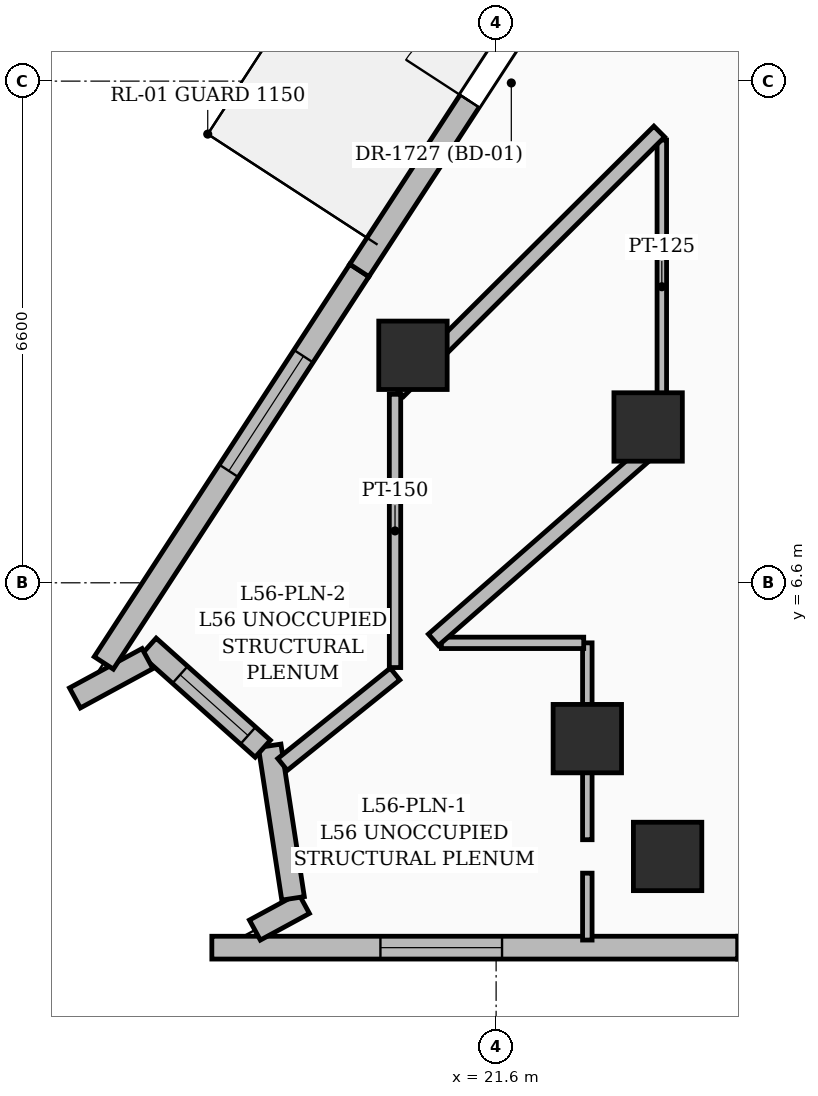
"""IFC4 building model, lengths in metres.
Left out: names, types, materials, properties, quantities, classifications, styles, units other than length and angle.
Written with IfcOpenShell. Run it as: python <this file> out.ifc"""

import sys

from ifc_helpers import new_model, si_unit, direction, frame, frame_2d, origin, origin_2d, place, context, subcontext, project, spatial, rectangle, extrude, element, fill, save


model = new_model("IFC4")
c1 = context("Model", 3, precision=1e-05, world=origin(), true_north=direction((0.0, 1.0)))
c2 = subcontext(c1, "Body", "Model", "MODEL_VIEW")
j1 = project(units=[si_unit("LENGTHUNIT", "METRE"), si_unit("PLANEANGLEUNIT", "RADIAN")], contexts=[c1])
p1 = place(None, origin())
s1 = spatial("IfcSite", under=j1, at=p1, CompositionType="ELEMENT")
p2 = place(p1, origin())
s2 = spatial("IfcBuilding", under=s1, at=p2, CompositionType="ELEMENT")
p3 = place(p2, frame((0.0, 0.0, 218.25)))
s3 = spatial("IfcBuildingStorey", under=s2, at=p3, CompositionType="ELEMENT", Elevation=218.25)
for number, where, z_axis, x_axis in (
    (1, (22.8, 4.55, 0.0), (0.0, 0.0, 1.0), (1.0, 0.0, 0.0)),
    (2, (23.6, 8.65, 0.0), (0.0, 0.0, 1.0), (1.0, 0.0, 0.0)),
    (3, (23.856, 3.0, 0.0), (0.0, 0.0, 1.0), (1.0, 0.0, 0.0)),
    (4, (20.506, 9.593, 0.0), (0.0, 0.0, 1.0), (1.0, 0.0, 0.0)),
):
    element("IfcColumn", number, at=place(p3, frame(where, z_axis=z_axis, x_axis=x_axis)), inside=s3, PredefinedType="COLUMN", context=c2, shape_type="SweptSolid", body=[
        extrude(rectangle(XDim=0.9, YDim=0.9, at=origin_2d()), origin(), (0.0, 0.0, 1.0), 3.75),
    ])
p4 = place(p3, frame((31.421, 1.8, 0.0), z_axis=(0.0, 0.0, 1.0), x_axis=(-1.0, 0.0, 0.0)))
e5 = element("IfcWall", 5, at=p4, inside=s3, PredefinedType="SOLIDWALL", context=c2, shape_type="SweptSolid", body=[
    extrude(rectangle(XDim=6.643, YDim=0.3, at=frame_2d((3.321, 0.0))), origin(), (0.0, 0.0, 1.0), 3.5),
])
p5 = place(p4, frame((4.775, 0.0, 0.8)))
e6 = element("IfcOpeningElement", 6, at=p5, cuts=e5, PredefinedType="OPENING", context=c2, shape_type="SweptSolid", body=[
    extrude(rectangle(XDim=1.2, YDim=1.8, at=frame_2d((0.6, 0.9))), frame((0.0, 0.16, 0.0), z_axis=(0.0, -1.0, 0.0), x_axis=(1.0, 0.0, 0.0)), (0.0, 0.0, 1.0), 0.32),
])
p6 = place(p3, frame((24.778, 1.8, 0.0), z_axis=(0.0, 0.0, 1.0), x_axis=(-1.0, 0.0, 0.0)))
e7 = element("IfcWall", 7, at=p6, inside=s3, PredefinedType="SOLIDWALL", context=c2, shape_type="SweptSolid", body=[
    extrude(rectangle(XDim=6.918, YDim=0.3, at=frame_2d((3.459, 0.0))), origin(), (0.0, 0.0, 1.0), 3.5),
])
p7 = place(p6, frame((3.1, 0.0, 0.55)))
e8 = element("IfcOpeningElement", 8, at=p7, cuts=e7, PredefinedType="OPENING", context=c2, shape_type="SweptSolid", body=[
    extrude(rectangle(XDim=1.6, YDim=2.2, at=frame_2d((0.8, 1.1))), frame((0.0, 0.16, 0.0), z_axis=(0.0, -1.0, 0.0), x_axis=(1.0, 0.0, 0.0)), (0.0, 0.0, 1.0), 0.32),
])
p8 = place(p3, frame((18.426, 2.031, 0.0), z_axis=(0.0, 0.0, 1.0), x_axis=(0.878833528688, 0.47712852446, 0.0)))
e9 = element("IfcWall", 9, at=p8, inside=s3, PredefinedType="SOLIDWALL", context=c2, shape_type="SweptSolid", body=[
    extrude(rectangle(XDim=0.735, YDim=0.3, at=frame_2d((0.367, 0.0))), origin(), (0.0, 0.0, 1.0), 3.5),
])
p9 = place(p3, frame((18.928, 2.448, 0.0), z_axis=(0.0, 0.0, 1.0), x_axis=(-0.151514993769, 0.98845495935, 0.0)))
e10 = element("IfcWall", 10, at=p9, inside=s3, PredefinedType="SOLIDWALL", context=c2, shape_type="SweptSolid", body=[
    extrude(rectangle(XDim=2.03, YDim=0.3, at=frame_2d((1.015, 0.0))), origin(), (0.0, 0.0, 1.0), 3.5),
])
p10 = place(p3, frame((18.53, 4.417, 0.0), z_axis=(0.0, 0.0, 1.0), x_axis=(-0.745548529149, 0.666451341572, 0.0)))
e11 = element("IfcWall", 11, at=p10, inside=s3, PredefinedType="SOLIDWALL", context=c2, shape_type="SweptSolid", body=[
    extrude(rectangle(XDim=2.016, YDim=0.3, at=frame_2d((1.008, 0.0))), origin(), (0.0, 0.0, 1.0), 3.5),
])
p11 = place(p10, frame((0.26, 0.0, 0.8)))
e12 = element("IfcOpeningElement", 12, at=p11, cuts=e11, PredefinedType="OPENING", context=c2, shape_type="SweptSolid", body=[
    extrude(rectangle(XDim=1.2, YDim=1.8, at=frame_2d((0.6, 0.9))), frame((0.0, 0.16, 0.0), z_axis=(0.0, -1.0, 0.0), x_axis=(1.0, 0.0, 0.0)), (0.0, 0.0, 1.0), 0.32),
])
p12 = place(p3, frame((17.013, 5.603, 0.0), z_axis=(0.0, 0.0, 1.0), x_axis=(-0.879044634191, -0.476739479275, 0.0)))
e13 = element("IfcWall", 13, at=p12, inside=s3, PredefinedType="SOLIDWALL", context=c2, shape_type="SweptSolid", body=[
    extrude(rectangle(XDim=1.086, YDim=0.3, at=frame_2d((0.543, 0.0))), origin(), (0.0, 0.0, 1.0), 3.5),
])
p13 = place(p3, frame((16.438, 5.546, 0.0), z_axis=(0.0, 0.0, 1.0), x_axis=(0.545606524508, 0.838041478934, 0.0)))
e14 = element("IfcWall", 14, at=p13, inside=s3, PredefinedType="SOLIDWALL", context=c2, shape_type="SweptSolid", body=[
    extrude(rectangle(XDim=6.162, YDim=0.3, at=frame_2d((3.081, 0.0))), origin(), (0.0, 0.0, 1.0), 3.5),
])
p14 = place(p13, frame((3.015, 0.0, 0.6)))
e15 = element("IfcOpeningElement", 15, at=p14, cuts=e14, PredefinedType="OPENING", context=c2, shape_type="SweptSolid", body=[
    extrude(rectangle(XDim=1.8, YDim=2.1, at=frame_2d((0.9, 1.05))), frame((0.0, 0.16, 0.0), z_axis=(0.0, -1.0, 0.0), x_axis=(1.0, 0.0, 0.0)), (0.0, 0.0, 1.0), 0.32),
])
p15 = place(p3, frame((19.801, 10.71, 0.0), z_axis=(0.0, 0.0, 1.0), x_axis=(0.545640788954, 0.838019170085, 0.0)))
e16 = element("IfcWall", 16, at=p15, inside=s3, PredefinedType="SOLIDWALL", context=c2, shape_type="SweptSolid", body=[
    extrude(rectangle(XDim=6.772, YDim=0.3, at=frame_2d((3.386, 0.0))), origin(), (0.0, 0.0, 1.0), 3.5),
])
p16 = place(p15, frame((2.657, 0.0, 0.0)))
e17 = element("IfcOpeningElement", 17, at=p16, cuts=e16, PredefinedType="OPENING", context=c2, shape_type="SweptSolid", body=[
    extrude(rectangle(XDim=1.0, YDim=2.2, at=frame_2d((0.5, 1.1))), frame((0.0, 0.16, 0.0), z_axis=(0.0, -1.0, 0.0), x_axis=(1.0, 0.0, 0.0)), (0.0, 0.0, 1.0), 0.32),
])
p17 = place(p3, frame((22.8, 2.78, 0.0), z_axis=(0.0, 0.0, 1.0), x_axis=(0.0, -1.0, 0.0)))
e18 = element("IfcWall", 18, at=p17, inside=s3, PredefinedType="PARTITIONING", context=c2, shape_type="SweptSolid", body=[
    extrude(rectangle(XDim=0.88, YDim=0.125, at=frame_2d((0.44, 0.0))), origin(), (0.0, 0.0, 1.0), 3.5),
])
p18 = place(p3, frame((22.8, 5.81, 0.0), z_axis=(0.0, 0.0, 1.0), x_axis=(0.0, -1.0, 0.0)))
e19 = element("IfcWall", 19, at=p18, inside=s3, PredefinedType="PARTITIONING", context=c2, shape_type="SweptSolid", body=[
    extrude(rectangle(XDim=2.59, YDim=0.125, at=frame_2d((1.295, 0.0))), origin(), (0.0, 0.0, 1.0), 2.82),
])
p19 = place(p3, frame((22.752, 5.81, 0.0), z_axis=(0.0, 0.0, 1.0), x_axis=(-1.0, 0.0, 0.0)))
e20 = element("IfcWall", 20, at=p19, inside=s3, PredefinedType="PARTITIONING", context=c2, shape_type="SweptSolid", body=[
    extrude(rectangle(XDim=1.873, YDim=0.15, at=frame_2d((0.936, 0.0))), origin(), (0.0, 0.0, 1.0), 2.82),
])
p20 = place(p3, frame((20.27, 5.4, 0.0), z_axis=(0.0, 0.0, 1.0), x_axis=(-0.779336278345, -0.626605909049, 0.0)))
e21 = element("IfcWall", 21, at=p20, inside=s3, PredefinedType="PARTITIONING", context=c2, shape_type="SweptSolid", body=[
    extrude(rectangle(XDim=1.899, YDim=0.2, at=frame_2d((0.949, 0.0))), origin(), (0.0, 0.0, 1.0), 3.5),
])
p21 = place(p3, frame((23.78, 8.48, 0.0), z_axis=(0.0, 0.0, 1.0), x_axis=(-0.752440343791, -0.65866040494, 0.0)))
e22 = element("IfcWall", 22, at=p21, inside=s3, PredefinedType="PARTITIONING", context=c2, shape_type="SweptSolid", body=[
    extrude(rectangle(XDim=3.993, YDim=0.2, at=frame_2d((1.997, 0.0))), origin(), (0.0, 0.0, 1.0), 2.82),
])
p22 = place(p3, frame((23.78, 12.425, 0.0), z_axis=(0.0, 0.0, 1.0), x_axis=(0.0, -1.0, 0.0)))
e23 = element("IfcWall", 23, at=p22, inside=s3, PredefinedType="PARTITIONING", context=c2, shape_type="SweptSolid", body=[
    extrude(rectangle(XDim=3.86, YDim=0.125, at=frame_2d((1.93, 0.0))), origin(), (0.0, 0.0, 1.0), 3.5),
])
p23 = place(p3, frame((20.27, 9.08, 0.0), z_axis=(0.0, 0.0, 1.0), x_axis=(0.0, -1.0, 0.0)))
e24 = element("IfcWall", 24, at=p23, inside=s3, PredefinedType="PARTITIONING", context=c2, shape_type="SweptSolid", body=[
    extrude(rectangle(XDim=3.595, YDim=0.15, at=frame_2d((1.797, 0.0))), origin(), (0.0, 0.0, 1.0), 3.5),
])
p24 = place(p3, frame((23.746, 12.537, 0.0), z_axis=(0.0, 0.0, 1.0), x_axis=(-0.709120600964, -0.705087209704, 0.0)))
e25 = element("IfcWall", 25, at=p24, inside=s3, PredefinedType="PARTITIONING", context=c2, shape_type="SweptSolid", body=[
    extrude(rectangle(XDim=4.842, YDim=0.2, at=frame_2d((2.421, 0.0))), origin(), (0.0, 0.0, 1.0), 2.82),
])
p25 = place(p7, origin())
e26 = element("IfcWindow", 26, at=p25, inside=s3, PartitioningType="SINGLE_PANEL", PredefinedType="WINDOW", context=c2, shape_type="SweptSolid", body=[
    extrude(rectangle(XDim=1.6, YDim=2.2, at=frame_2d((0.8, 1.1))), frame((0.0, 0.03, 0.0), z_axis=(0.0, -1.0, 0.0), x_axis=(1.0, 0.0, 0.0)), (0.0, 0.0, 1.0), 0.06),
])
fill(e8, e26)
p26 = place(p11, origin())
e27 = element("IfcWindow", 27, at=p26, inside=s3, PartitioningType="SINGLE_PANEL", PredefinedType="WINDOW", context=c2, shape_type="SweptSolid", body=[
    extrude(rectangle(XDim=1.2, YDim=1.8, at=frame_2d((0.6, 0.9))), frame((0.0, 0.03, 0.0), z_axis=(0.0, -1.0, 0.0), x_axis=(1.0, 0.0, 0.0)), (0.0, 0.0, 1.0), 0.06),
])
fill(e12, e27)
p27 = place(p14, origin())
e28 = element("IfcWindow", 28, at=p27, inside=s3, PartitioningType="SINGLE_PANEL", PredefinedType="WINDOW", context=c2, shape_type="SweptSolid", body=[
    extrude(rectangle(XDim=1.8, YDim=2.1, at=frame_2d((0.9, 1.05))), frame((0.0, 0.03, 0.0), z_axis=(0.0, -1.0, 0.0), x_axis=(1.0, 0.0, 0.0)), (0.0, 0.0, 1.0), 0.06),
])
fill(e15, e28)
p28 = place(p16, origin())
e29 = element("IfcDoor", 29, at=p28, inside=s3, OperationType="SINGLE_SWING_LEFT", PredefinedType="DOOR", context=c2, shape_type="SweptSolid", body=[
    extrude(rectangle(XDim=1.0, YDim=2.2, at=frame_2d((0.5, 1.1))), frame((0.0, 0.025, 0.0), z_axis=(0.0, -1.0, 0.0), x_axis=(1.0, 0.0, 0.0)), (0.0, 0.0, 1.0), 0.05),
])
fill(e17, e29)
save(model, sys.argv[1])
